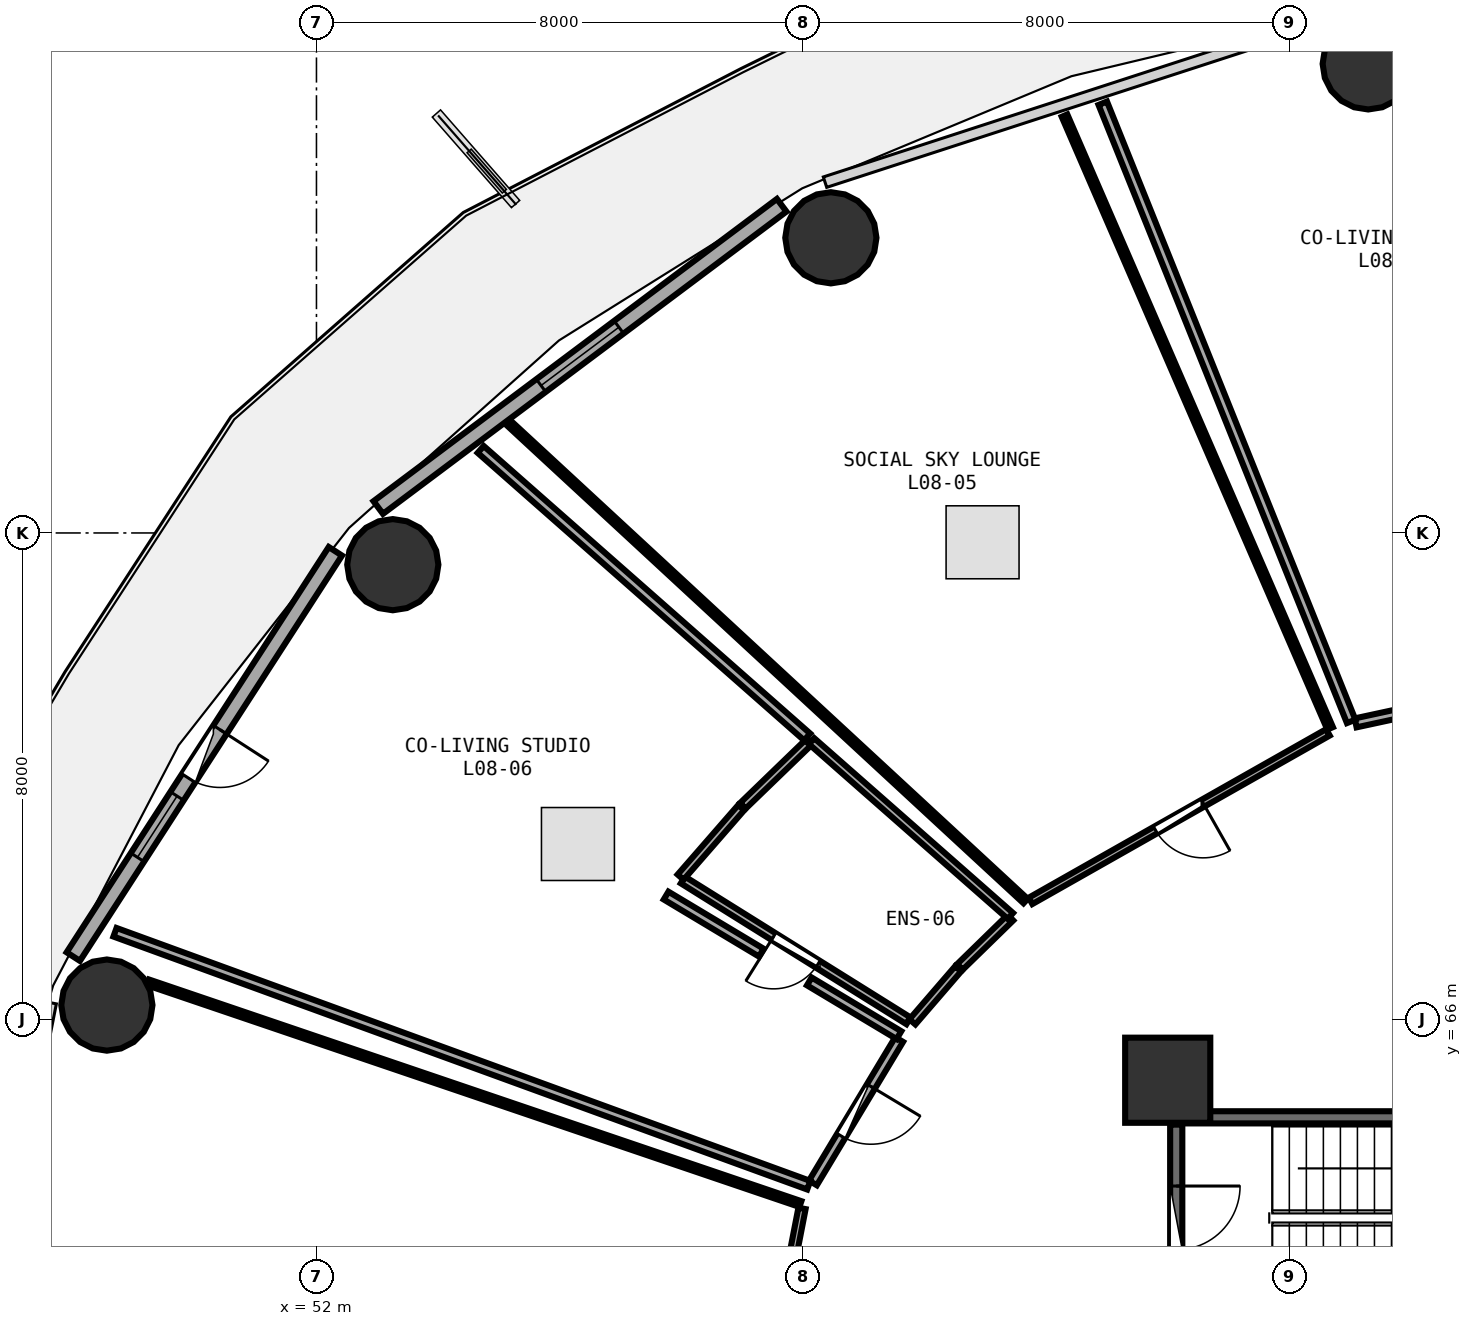
"""IFC4 building model, lengths in metres.
Left out: names, types, materials, properties, quantities, classifications, styles, units other than length and angle.
Written with IfcOpenShell. Run it as: python <this file> out.ifc"""

import sys

from ifc_helpers import new_model, si_unit, direction, frame, frame_2d, origin, origin_2d, place, context, subcontext, project, spatial, rectangle, circle, extrude, element, fill, save


model = new_model("IFC4")
c1 = context("Model", 3, precision=1e-05, world=origin(), true_north=direction((0.0, 1.0)))
c2 = subcontext(c1, "Body", "Model", "MODEL_VIEW")
j1 = project(units=[si_unit("LENGTHUNIT", "METRE"), si_unit("PLANEANGLEUNIT", "RADIAN")], contexts=[c1])
p1 = place(None, origin())
s1 = spatial("IfcSite", under=j1, at=p1, CompositionType="ELEMENT")
p2 = place(p1, origin())
s2 = spatial("IfcBuilding", under=s1, at=p2, CompositionType="ELEMENT")
p3 = place(p2, frame((0.0, 0.0, 33.75)))
s3 = spatial("IfcBuildingStorey", under=s2, at=p3, CompositionType="ELEMENT", Elevation=33.75)
p4 = place(p3, frame((66.0, 65.0, 0.0), z_axis=(0.0, 0.0, 1.0), x_axis=(1.0, 0.0, 0.0)))
e1 = element("IfcColumn", 1, at=p4, inside=s3, PredefinedType="PILASTER", context=c2, shape_type="SweptSolid", body=[
    extrude(rectangle(XDim=1.4, YDim=1.4, at=origin_2d()), origin(), (0.0, 0.0, 1.0), 3.75),
])
for number, where, z_axis, x_axis in (
    (2, (69.298, 81.714, 0.0), (0.0, 0.0, 1.0), (1.0, 0.0, 0.0)),
    (3, (60.46, 78.854, 0.0), (0.0, 0.0, 1.0), (1.0, 0.0, 0.0)),
    (4, (53.256, 73.478, 0.0), (0.0, 0.0, 1.0), (1.0, 0.0, 0.0)),
    (5, (48.553, 66.236, 0.0), (0.0, 0.0, 1.0), (1.0, 0.0, 0.0)),
):
    element("IfcColumn", number, at=place(p3, frame(where, z_axis=z_axis, x_axis=x_axis)), inside=s3, PredefinedType="COLUMN", context=c2, shape_type="SweptSolid", body=[
        extrude(circle(Radius=0.75, at=origin_2d()), origin(), (0.0, 0.0, 1.0), 3.75),
    ])
p5 = place(p3, frame((59.651, 79.389, 0.0), z_axis=(0.0, 0.0, 1.0), x_axis=(-0.80030733173, -0.599590005569, 0.0)))
e6 = element("IfcWall", 6, at=p5, inside=s3, PredefinedType="SOLIDWALL", context=c2, shape_type="SweptSolid", body=[
    extrude(rectangle(XDim=8.291, YDim=0.26, at=frame_2d((4.145, 0.0))), origin(), (0.0, 0.0, 1.0), 3.475),
])
p6 = place(p5, frame((3.345, 0.0, 0.85)))
e7 = element("IfcOpeningElement", 7, at=p6, cuts=e6, PredefinedType="OPENING", context=c2, shape_type="SweptSolid", body=[
    extrude(rectangle(XDim=1.6, YDim=1.45, at=frame_2d((0.8, 0.725))), frame((0.0, 0.14, 0.0), z_axis=(0.0, -1.0, 0.0), x_axis=(1.0, 0.0, 0.0)), (0.0, 0.0, 1.0), 0.28),
])
p7 = place(p3, frame((52.311, 73.698, 0.0), z_axis=(0.0, 0.0, 1.0), x_axis=(-0.543005114258, -0.839729388488, 0.0)))
e8 = element("IfcWall", 8, at=p7, inside=s3, PredefinedType="SOLIDWALL", context=c2, shape_type="SweptSolid", body=[
    extrude(rectangle(XDim=7.938, YDim=0.26, at=frame_2d((3.969, 0.0))), origin(), (0.0, 0.0, 1.0), 3.475),
])
p8 = place(p7, frame((3.494, 0.0, 0.0)))
e9 = element("IfcOpeningElement", 9, at=p8, cuts=e8, PredefinedType="OPENING", context=c2, shape_type="SweptSolid", body=[
    extrude(rectangle(XDim=0.95, YDim=2.1, at=frame_2d((0.475, 1.05))), frame((0.0, 0.14, 0.0), z_axis=(0.0, -1.0, 0.0), x_axis=(1.0, 0.0, 0.0)), (0.0, 0.0, 1.0), 0.28),
])
p9 = place(p7, frame((4.794, 0.0, 0.85)))
e10 = element("IfcOpeningElement", 10, at=p9, cuts=e8, PredefinedType="OPENING", context=c2, shape_type="SweptSolid", body=[
    extrude(rectangle(XDim=1.2, YDim=1.45, at=frame_2d((0.6, 0.725))), frame((0.0, 0.14, 0.0), z_axis=(0.0, -1.0, 0.0), x_axis=(1.0, 0.0, 0.0)), (0.0, 0.0, 1.0), 0.28),
])
p10 = place(p3, frame((73.42, 64.39, 0.0), z_axis=(0.0, 0.0, 1.0), x_axis=(-1.0, 0.0, 0.0)))
e11 = element("IfcWall", 11, at=p10, inside=s3, PredefinedType="SHEAR", context=c2, shape_type="SweptSolid", body=[
    extrude(rectangle(XDim=7.16, YDim=0.2, at=frame_2d((3.58, 0.0))), origin(), (0.0, 0.0, 1.0), 3.49),
])
p11 = place(p3, frame((66.14, 64.27, 0.0), z_axis=(0.0, 0.0, 1.0), x_axis=(0.0, -1.0, 0.0)))
e12 = element("IfcWall", 12, at=p11, inside=s3, PredefinedType="SHEAR", context=c2, shape_type="SweptSolid", body=[
    extrude(rectangle(XDim=3.07, YDim=0.2, at=frame_2d((1.535, 0.0))), origin(), (0.0, 0.0, 1.0), 3.49),
])
p12 = place(p11, frame((1.01, 0.0, 0.0)))
e13 = element("IfcOpeningElement", 13, at=p12, cuts=e12, PredefinedType="OPENING", context=c2, shape_type="SweptSolid", body=[
    extrude(rectangle(XDim=1.05, YDim=2.1, at=frame_2d((0.525, 1.05))), frame((0.0, 0.11, 0.0), z_axis=(0.0, -1.0, 0.0), x_axis=(1.0, 0.0, 0.0)), (0.0, 0.0, 1.0), 0.22),
])
p13 = place(p3, frame((71.981, 71.501, 0.0), z_axis=(0.0, 0.0, 1.0), x_axis=(-0.977451938751, -0.211158015313, 0.0)))
e14 = element("IfcWall", 14, at=p13, inside=s3, PredefinedType="PARTITIONING", context=c2, shape_type="SweptSolid", body=[
    extrude(rectangle(XDim=2.958, YDim=0.15, at=frame_2d((1.479, 0.0))), origin(), (0.0, 0.0, 1.0), 2.875),
])
p14 = place(p13, frame((1.004, 0.0, 0.0)))
e15 = element("IfcOpeningElement", 15, at=p14, cuts=e14, PredefinedType="OPENING", context=c2, shape_type="SweptSolid", body=[
    extrude(rectangle(XDim=0.95, YDim=2.08, at=frame_2d((0.475, 1.04))), frame((0.0, 0.085, 0.0), z_axis=(0.0, -1.0, 0.0), x_axis=(1.0, 0.0, 0.0)), (0.0, 0.0, 1.0), 0.17),
])
p15 = place(p3, frame((68.635, 70.72, 0.0), z_axis=(0.0, 0.0, 1.0), x_axis=(-0.870068136537, -0.49293147372, 0.0)))
e16 = element("IfcWall", 16, at=p15, inside=s3, PredefinedType="PARTITIONING", context=c2, shape_type="SweptSolid", body=[
    extrude(rectangle(XDim=5.621, YDim=0.12, at=frame_2d((2.811, 0.0))), origin(), (0.0, 0.0, 1.0), 2.875),
])
p16 = place(p15, frame((2.36, 0.0, 0.0)))
e17 = element("IfcOpeningElement", 17, at=p16, cuts=e16, PredefinedType="OPENING", context=c2, shape_type="SweptSolid", body=[
    extrude(rectangle(XDim=0.9, YDim=2.08, at=frame_2d((0.45, 1.04))), frame((0.0, 0.07, 0.0), z_axis=(0.0, -1.0, 0.0), x_axis=(1.0, 0.0, 0.0)), (0.0, 0.0, 1.0), 0.14),
])
p17 = place(p3, frame((61.737, 65.977, 0.0), z_axis=(0.0, 0.0, 1.0), x_axis=(-0.848252205707, 0.529592480605, 0.0)))
e18 = element("IfcWall", 18, at=p17, inside=s3, PredefinedType="PLUMBINGWALL", context=c2, shape_type="SweptSolid", body=[
    extrude(rectangle(XDim=4.374, YDim=0.13, at=frame_2d((2.187, 0.0))), origin(), (0.0, 0.0, 1.0), 3.235),
])
p18 = place(p17, frame((1.757, 0.0, 0.0)))
e19 = element("IfcOpeningElement", 19, at=p18, cuts=e18, PredefinedType="OPENING", context=c2, shape_type="SweptSolid", body=[
    extrude(rectangle(XDim=0.86, YDim=2.05, at=frame_2d((0.43, 1.025))), frame((0.0, 0.075, 0.0), z_axis=(0.0, -1.0, 0.0), x_axis=(1.0, 0.0, 0.0)), (0.0, 0.0, 1.0), 0.15),
])
p19 = place(p3, frame((61.583, 65.67, 0.0), z_axis=(0.0, 0.0, 1.0), x_axis=(-0.515343511704, -0.85698370168, 0.0)))
e20 = element("IfcWall", 20, at=p19, inside=s3, PredefinedType="PARTITIONING", context=c2, shape_type="SweptSolid", body=[
    extrude(rectangle(XDim=2.752, YDim=0.15, at=frame_2d((1.376, 0.0))), origin(), (0.0, 0.0, 1.0), 2.875),
])
p20 = place(p19, frame((0.901, 0.0, 0.0)))
e21 = element("IfcOpeningElement", 21, at=p20, cuts=e20, PredefinedType="OPENING", context=c2, shape_type="SweptSolid", body=[
    extrude(rectangle(XDim=0.95, YDim=2.08, at=frame_2d((0.475, 1.04))), frame((0.0, 0.085, 0.0), z_axis=(0.0, -1.0, 0.0), x_axis=(1.0, 0.0, 0.0)), (0.0, 0.0, 1.0), 0.17),
])
p21 = place(p3, frame((59.986, 62.892, 0.0), z_axis=(0.0, 0.0, 1.0), x_axis=(-0.190897102704, -0.981610053015, 0.0)))
e22 = element("IfcWall", 22, at=p21, inside=s3, PredefinedType="PARTITIONING", context=c2, shape_type="SweptSolid", body=[
    extrude(rectangle(XDim=5.239, YDim=0.12, at=frame_2d((2.619, 0.0))), origin(), (0.0, 0.0, 1.0), 2.875),
])
p22 = place(p21, frame((2.169, 0.0, 0.0)))
e23 = element("IfcOpeningElement", 23, at=p22, cuts=e22, PredefinedType="OPENING", context=c2, shape_type="SweptSolid", body=[
    extrude(rectangle(XDim=0.9, YDim=2.08, at=frame_2d((0.45, 1.04))), frame((0.0, 0.07, 0.0), z_axis=(0.0, -1.0, 0.0), x_axis=(1.0, 0.0, 0.0)), (0.0, 0.0, 1.0), 0.14),
])
p23 = place(p3, frame((69.017, 70.901, 0.0), z_axis=(0.0, 0.0, 1.0), x_axis=(-0.372877076454, 0.927880749803, 0.0)))
e24 = element("IfcWall", 24, at=p23, inside=s3, PredefinedType="PARTITIONING", context=c2, shape_type="SweptSolid", body=[
    extrude(rectangle(XDim=10.956, YDim=0.15, at=frame_2d((5.478, 0.0))), origin(), (0.0, 0.0, 1.0), 2.875),
])
p24 = place(p3, frame((63.663, 67.947, 0.0), z_axis=(0.0, 0.0, 1.0), x_axis=(-0.734175040947, 0.678960241288, 0.0)))
e25 = element("IfcWall", 25, at=p24, inside=s3, PredefinedType="PARTITIONING", context=c2, shape_type="SweptSolid", body=[
    extrude(rectangle(XDim=11.549, YDim=0.1, at=frame_2d((5.775, 0.0))), origin(), (0.0, 0.0, 1.0), 2.875),
])
p25 = place(p3, frame((64.303, 80.863, 0.0), z_axis=(0.0, 0.0, 1.0), x_axis=(0.397730954589, -0.917502091421, 0.0)))
e26 = element("IfcWall", 26, at=p25, inside=s3, PredefinedType="PARTITIONING", context=c2, shape_type="SweptSolid", body=[
    extrude(rectangle(XDim=10.983, YDim=0.1, at=frame_2d((5.491, 0.0))), origin(), (0.0, 0.0, 1.0), 2.875),
])
p26 = place(p3, frame((63.414, 67.674, 0.0), z_axis=(0.0, 0.0, 1.0), x_axis=(-0.715868961368, -0.698234652642, 0.0)))
e27 = element("IfcWall", 27, at=p26, inside=s3, PredefinedType="PLUMBINGWALL", context=c2, shape_type="SweptSolid", body=[
    extrude(rectangle(XDim=1.163, YDim=0.13, at=frame_2d((0.582, 0.0))), origin(), (0.0, 0.0, 1.0), 2.875),
])
p27 = place(p3, frame((62.554, 66.833, 0.0), z_axis=(0.0, 0.0, 1.0), x_axis=(-0.6531951623, -0.757189593133, 0.0)))
e28 = element("IfcWall", 28, at=p27, inside=s3, PredefinedType="PLUMBINGWALL", context=c2, shape_type="SweptSolid", body=[
    extrude(rectangle(XDim=1.153, YDim=0.13, at=frame_2d((0.576, 0.0))), origin(), (0.0, 0.0, 1.0), 3.48),
])
p28 = place(p3, frame((57.989, 68.34, 0.0), z_axis=(0.0, 0.0, 1.0), x_axis=(0.657010944672, 0.75388103742, 0.0)))
e29 = element("IfcWall", 29, at=p28, inside=s3, PredefinedType="PLUMBINGWALL", context=c2, shape_type="SweptSolid", body=[
    extrude(rectangle(XDim=1.517, YDim=0.13, at=frame_2d((0.759, 0.0))), origin(), (0.0, 0.0, 1.0), 2.875),
])
p29 = place(p3, frame((59.013, 69.513, 0.0), z_axis=(0.0, 0.0, 1.0), x_axis=(0.719052166998, 0.69495610015, 0.0)))
e30 = element("IfcWall", 30, at=p29, inside=s3, PredefinedType="PLUMBINGWALL", context=c2, shape_type="SweptSolid", body=[
    extrude(rectangle(XDim=1.53, YDim=0.13, at=frame_2d((0.765, 0.0))), origin(), (0.0, 0.0, 1.0), 2.875),
])
p30 = place(p3, frame((60.143, 70.577, 0.0), z_axis=(0.0, 0.0, 1.0), x_axis=(0.750928130077, -0.660383936403, 0.0)))
e31 = element("IfcWall", 31, at=p30, inside=s3, PredefinedType="PLUMBINGWALL", context=c2, shape_type="SweptSolid", body=[
    extrude(rectangle(XDim=4.355, YDim=0.13, at=frame_2d((2.177, 0.0))), origin(), (0.0, 0.0, 1.0), 3.235),
])
p31 = place(p3, frame((60.096, 63.274, 0.0), z_axis=(0.0, 0.0, 1.0), x_axis=(-0.939512545551, 0.342514491304, 0.0)))
e32 = element("IfcWall", 32, at=p31, inside=s3, PredefinedType="PARTITIONING", context=c2, shape_type="SweptSolid", body=[
    extrude(rectangle(XDim=12.145, YDim=0.15, at=frame_2d((6.072, 0.0))), origin(), (0.0, 0.0, 1.0), 2.875),
])
p32 = place(p3, frame((54.701, 75.374, 0.0), z_axis=(0.0, 0.0, 1.0), x_axis=(0.750492781032, -0.660878646666, 0.0)))
e33 = element("IfcWall", 33, at=p32, inside=s3, PredefinedType="PARTITIONING", context=c2, shape_type="SweptSolid", body=[
    extrude(rectangle(XDim=7.154, YDim=0.15, at=frame_2d((3.577, 0.0))), origin(), (0.0, 0.0, 1.0), 2.875),
])
p33 = place(p3, frame((57.75, 68.036, 0.0), z_axis=(0.0, 0.0, 1.0), x_axis=(0.857787746423, -0.514004068161, 0.0)))
e34 = element("IfcWall", 34, at=p33, inside=s3, PredefinedType="PARTITIONING", context=c2, shape_type="SweptSolid", body=[
    extrude(rectangle(XDim=1.826, YDim=0.15, at=frame_2d((0.913, 0.0))), origin(), (0.0, 0.0, 1.0), 3.48),
])
p34 = place(p3, frame((60.106, 66.625, 0.0), z_axis=(0.0, 0.0, 1.0), x_axis=(0.8577560852, -0.514056901814, 0.0)))
e35 = element("IfcWall", 35, at=p34, inside=s3, PredefinedType="PARTITIONING", context=c2, shape_type="SweptSolid", body=[
    extrude(rectangle(XDim=1.718, YDim=0.15, at=frame_2d((0.859, 0.0))), origin(), (0.0, 0.0, 1.0), 3.235),
])
p35 = place(p3, frame((49.233, 66.608, 0.0), z_axis=(0.0, 0.0, 1.0), x_axis=(0.946848647549, -0.321679403499, 0.0)))
e36 = element("IfcWall", 36, at=p35, inside=s3, PredefinedType="PARTITIONING", context=c2, shape_type="SweptSolid", body=[
    extrude(rectangle(XDim=11.328, YDim=0.1, at=frame_2d((5.664, 0.0))), origin(), (0.0, 0.0, 1.0), 2.875),
])
p36 = place(p6, origin())
e37 = element("IfcWindow", 37, at=p36, inside=s3, PartitioningType="SINGLE_PANEL", PredefinedType="WINDOW", context=c2, shape_type="SweptSolid", body=[
    extrude(rectangle(XDim=1.6, YDim=1.45, at=frame_2d((0.8, 0.725))), frame((0.0, 0.03, 0.0), z_axis=(0.0, -1.0, 0.0), x_axis=(1.0, 0.0, 0.0)), (0.0, 0.0, 1.0), 0.06),
])
fill(e7, e37)
p37 = place(p8, frame((0.95, 0.0, 0.0), z_axis=(0.0, 0.0, 1.0), x_axis=(-1.0, 0.0, 0.0)))
e38 = element("IfcDoor", 38, at=p37, inside=s3, OperationType="SINGLE_SWING_RIGHT", PredefinedType="DOOR", context=c2, shape_type="SweptSolid", body=[
    extrude(rectangle(XDim=0.95, YDim=2.1, at=frame_2d((0.475, 1.05))), frame((0.0, 0.025, 0.0), z_axis=(0.0, -1.0, 0.0), x_axis=(1.0, 0.0, 0.0)), (0.0, 0.0, 1.0), 0.05),
])
fill(e9, e38)
p38 = place(p9, origin())
e39 = element("IfcWindow", 39, at=p38, inside=s3, PartitioningType="SINGLE_PANEL", PredefinedType="WINDOW", context=c2, shape_type="SweptSolid", body=[
    extrude(rectangle(XDim=1.2, YDim=1.45, at=frame_2d((0.6, 0.725))), frame((0.0, 0.03, 0.0), z_axis=(0.0, -1.0, 0.0), x_axis=(1.0, 0.0, 0.0)), (0.0, 0.0, 1.0), 0.06),
])
fill(e10, e39)
p39 = place(p12, origin())
e40 = element("IfcDoor", 40, at=p39, inside=s3, OperationType="SINGLE_SWING_LEFT", PredefinedType="DOOR", context=c2, shape_type="SweptSolid", body=[
    extrude(rectangle(XDim=1.05, YDim=2.1, at=frame_2d((0.525, 1.05))), frame((0.0, 0.025, 0.0), z_axis=(0.0, -1.0, 0.0), x_axis=(1.0, 0.0, 0.0)), (0.0, 0.0, 1.0), 0.05),
])
fill(e13, e40)
p40 = place(p16, origin())
e41 = element("IfcDoor", 41, at=p40, inside=s3, OperationType="SINGLE_SWING_LEFT", PredefinedType="DOOR", context=c2, shape_type="SweptSolid", body=[
    extrude(rectangle(XDim=0.9, YDim=2.08, at=frame_2d((0.45, 1.04))), frame((0.0, 0.025, 0.0), z_axis=(0.0, -1.0, 0.0), x_axis=(1.0, 0.0, 0.0)), (0.0, 0.0, 1.0), 0.05),
])
fill(e17, e41)
p41 = place(p18, origin())
e42 = element("IfcDoor", 42, at=p41, inside=s3, OperationType="SINGLE_SWING_RIGHT", PredefinedType="DOOR", context=c2, shape_type="SweptSolid", body=[
    extrude(rectangle(XDim=0.86, YDim=2.05, at=frame_2d((0.43, 1.025))), frame((0.0, 0.025, 0.0), z_axis=(0.0, -1.0, 0.0), x_axis=(1.0, 0.0, 0.0)), (0.0, 0.0, 1.0), 0.05),
])
fill(e19, e42)
p42 = place(p20, origin())
e43 = element("IfcDoor", 43, at=p42, inside=s3, OperationType="SINGLE_SWING_LEFT", PredefinedType="DOOR", context=c2, shape_type="SweptSolid", body=[
    extrude(rectangle(XDim=0.95, YDim=2.08, at=frame_2d((0.475, 1.04))), frame((0.0, 0.025, 0.0), z_axis=(0.0, -1.0, 0.0), x_axis=(1.0, 0.0, 0.0)), (0.0, 0.0, 1.0), 0.05),
])
fill(e21, e43)
save(model, sys.argv[1])
